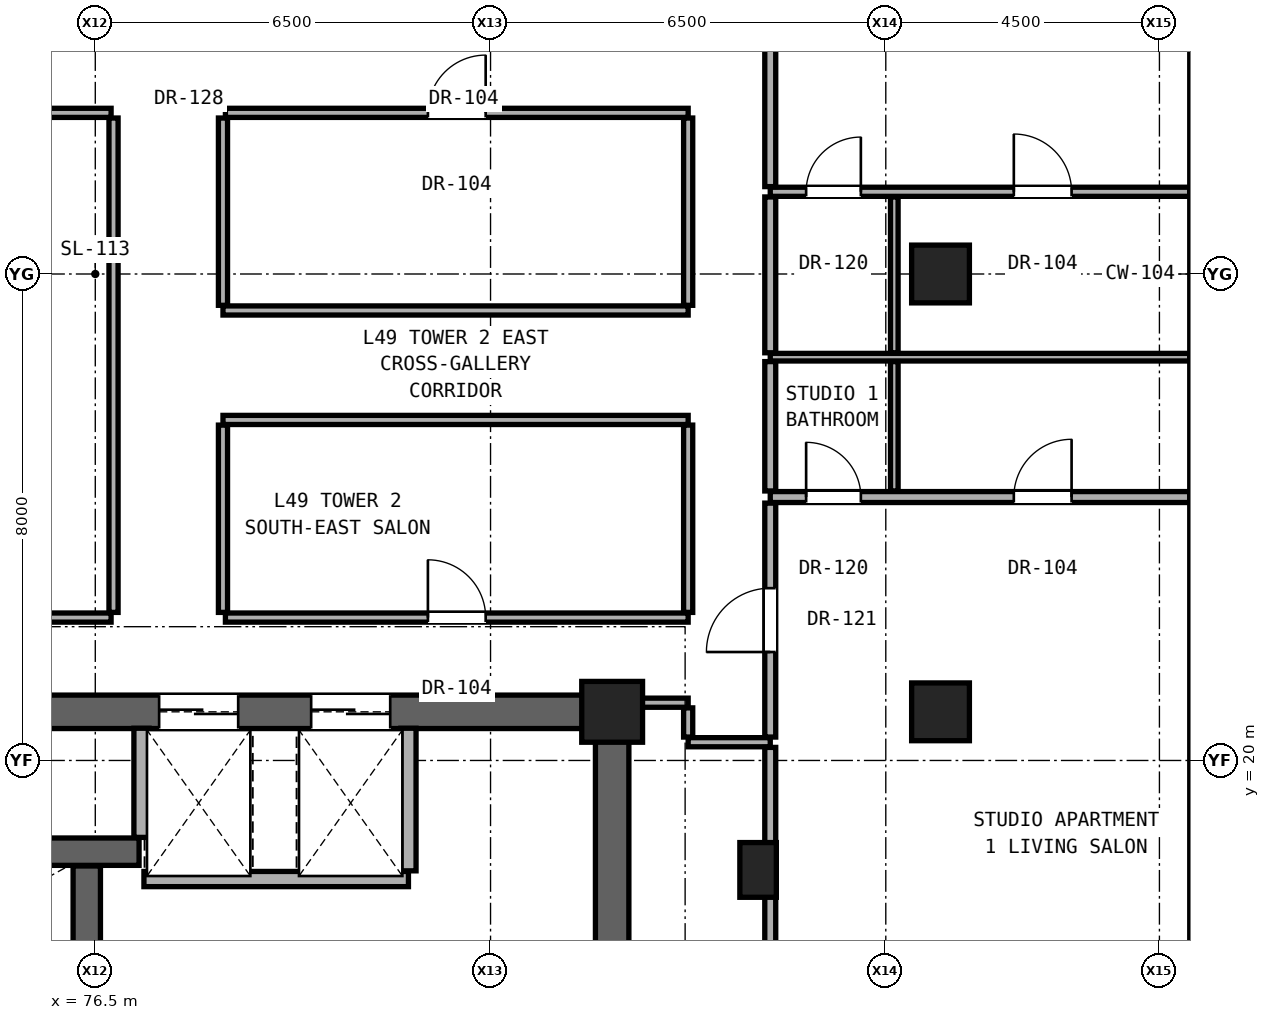
"""IFC4 building model, lengths in metres.
Left out: names, types, materials, properties, quantities, classifications, styles, units other than length and angle.
Written with IfcOpenShell. Run it as: python <this file> out.ifc"""

import sys

from ifc_helpers import new_model, si_unit, direction, frame, frame_2d, origin, origin_2d, place, context, subcontext, project, spatial, rectangle, hollow_rectangle, extrude, element, fill, save


model = new_model("IFC4")
c1 = context("Model", 3, precision=1e-05, world=origin(), true_north=direction((0.0, 1.0)))
c2 = subcontext(c1, "Body", "Model", "MODEL_VIEW")
j1 = project(units=[si_unit("LENGTHUNIT", "METRE"), si_unit("PLANEANGLEUNIT", "RADIAN")], contexts=[c1])
p1 = place(None, origin())
s1 = spatial("IfcSite", under=j1, at=p1, CompositionType="ELEMENT")
p2 = place(p1, origin())
s2 = spatial("IfcBuilding", under=s1, at=p2, CompositionType="ELEMENT")
p3 = place(p2, frame((0.0, 0.0, 173.9)))
s3 = spatial("IfcBuildingStorey", under=s2, at=p3, CompositionType="ELEMENT", Elevation=173.9)
p4 = place(p3, frame((85.0, 20.8, 0.0), z_axis=(0.0, 0.0, 1.0), x_axis=(1.0, 0.0, 0.0)))
e1 = element("IfcColumn", 1, at=p4, inside=s3, PredefinedType="COLUMN", context=c2, shape_type="SweptSolid", body=[
    extrude(rectangle(XDim=1.0, YDim=1.0, at=origin_2d()), origin(), (0.0, 0.0, 1.0), 3.25),
])
for number, where, z_axis, x_axis in (
    (2, (90.4, 20.8, 0.0), (0.0, 0.0, 1.0), (1.0, 0.0, 0.0)),
    (3, (90.4, 28.0, 0.0), (0.0, 0.0, 1.0), (1.0, 0.0, 0.0)),
):
    element("IfcColumn", number, at=place(p3, frame(where, z_axis=z_axis, x_axis=x_axis)), inside=s3, PredefinedType="COLUMN", context=c2, shape_type="SweptSolid", body=[
        extrude(hollow_rectangle(XDim=0.95, YDim=0.95, WallThickness=0.05, at=origin_2d()), origin(), (0.0, 0.0, 1.0), 3.25),
    ])
p5 = place(p3, frame((87.4, 18.2, 0.0), z_axis=(0.0, 0.0, 1.0), x_axis=(1.0, 0.0, 0.0)))
e4 = element("IfcColumn", 4, at=p5, inside=s3, PredefinedType="PILASTER", context=c2, shape_type="SweptSolid", body=[
    extrude(rectangle(XDim=0.6, YDim=0.9, at=origin_2d()), origin(), (0.0, 0.0, 1.0), 3.25),
])
p6 = place(p3, frame((85.0, 15.2, 0.0), z_axis=(0.0, 0.0, 1.0), x_axis=(0.0, 1.0, 0.0)))
e5 = element("IfcWall", 5, at=p6, inside=s3, PredefinedType="SHEAR", context=c2, shape_type="SweptSolid", body=[
    extrude(rectangle(XDim=5.6, YDim=0.55, at=frame_2d((2.8, 0.0))), origin(), (0.0, 0.0, 1.0), 3.05),
])
p7 = place(p3, frame((68.0, 20.8, 0.0), z_axis=(0.0, 0.0, 1.0), x_axis=(1.0, 0.0, 0.0)))
e6 = element("IfcWall", 6, at=p7, inside=s3, PredefinedType="SHEAR", context=c2, shape_type="SweptSolid", body=[
    extrude(rectangle(XDim=17.0, YDim=0.55, at=frame_2d((8.5, 0.0))), origin(), (0.0, 0.0, 1.0), 3.05),
])
p8 = place(p7, frame((9.55, 0.0, 0.0)))
e7 = element("IfcOpeningElement", 7, at=p8, cuts=e6, PredefinedType="OPENING", context=c2, shape_type="SweptSolid", body=[
    extrude(rectangle(XDim=1.3, YDim=2.3, at=frame_2d((0.65, 1.15))), frame((0.0, 0.285, 0.0), z_axis=(0.0, -1.0, 0.0), x_axis=(1.0, 0.0, 0.0)), (0.0, 0.0, 1.0), 0.57),
])
p9 = place(p7, frame((12.05, 0.0, 0.0)))
e8 = element("IfcOpeningElement", 8, at=p9, cuts=e6, PredefinedType="OPENING", context=c2, shape_type="SweptSolid", body=[
    extrude(rectangle(XDim=1.3, YDim=2.3, at=frame_2d((0.65, 1.15))), frame((0.0, 0.285, 0.0), z_axis=(0.0, -1.0, 0.0), x_axis=(1.0, 0.0, 0.0)), (0.0, 0.0, 1.0), 0.57),
])
p10 = place(p3, frame((77.3, 18.05, 0.0), z_axis=(0.0, 0.0, 1.0), x_axis=(1.0, 0.0, 0.0)))
e9 = element("IfcWall", 9, at=p10, inside=s3, PredefinedType="SOLIDWALL", context=c2, shape_type="SweptSolid", body=[
    extrude(rectangle(XDim=4.35, YDim=0.25, at=frame_2d((2.175, 0.0))), origin(), (0.0, 0.0, 1.0), 3.05),
])
p11 = place(p3, frame((68.27, 18.5, 0.0), z_axis=(0.0, 0.0, 1.0), x_axis=(1.0, 0.0, 0.0)))
e10 = element("IfcWall", 10, at=p11, inside=s3, PredefinedType="SHEAR", context=c2, shape_type="SweptSolid", body=[
    extrude(rectangle(XDim=8.95, YDim=0.45, at=frame_2d((4.475, 0.0))), origin(), (0.0, 0.0, 1.0), 3.05),
])
p12 = place(p11, frame((0.52, 0.0, 0.0)))
e11 = element("IfcOpeningElement", 11, at=p12, cuts=e10, PredefinedType="OPENING", context=c2, shape_type="SweptSolid", body=[
    extrude(rectangle(XDim=1.15, YDim=2.2, at=frame_2d((0.575, 1.1))), frame((0.0, 0.235, 0.0), z_axis=(0.0, -1.0, 0.0), x_axis=(1.0, 0.0, 0.0)), (0.0, 0.0, 1.0), 0.47),
])
p13 = place(p3, frame((86.25, 20.3, 0.0), z_axis=(0.0, 0.0, 1.0), x_axis=(1.0, 0.0, 0.0)))
e12 = element("IfcWall", 12, at=p13, inside=s3, PredefinedType="PARTITIONING", context=c2, shape_type="SweptSolid", body=[
    extrude(rectangle(XDim=1.35, YDim=0.15, at=frame_2d((0.675, 0.0))), origin(), (0.0, 0.0, 1.0), 3.05),
])
p14 = place(p3, frame((85.27, 20.95, 0.0), z_axis=(0.0, 0.0, 1.0), x_axis=(1.0, 0.0, 0.0)))
e13 = element("IfcWall", 13, at=p14, inside=s3, PredefinedType="PARTITIONING", context=c2, shape_type="SweptSolid", body=[
    extrude(rectangle(XDim=0.98, YDim=0.15, at=frame_2d((0.49, 0.0))), origin(), (0.0, 0.0, 1.0), 2.442),
])
p15 = place(p3, frame((66.62, 22.35, 0.0), z_axis=(0.0, 0.0, 1.0), x_axis=(1.0, 0.0, 0.0)))
e14 = element("IfcWall", 14, at=p15, inside=s3, PredefinedType="PARTITIONING", context=c2, shape_type="SweptSolid", body=[
    extrude(rectangle(XDim=10.14, YDim=0.15, at=frame_2d((5.07, 0.0))), origin(), (0.0, 0.0, 1.0), 2.186),
])
p16 = place(p3, frame((78.64, 22.35, 0.0), z_axis=(0.0, 0.0, 1.0), x_axis=(1.0, 0.0, 0.0)))
e15 = element("IfcWall", 15, at=p16, inside=s3, PredefinedType="PARTITIONING", context=c2, shape_type="SweptSolid", body=[
    extrude(rectangle(XDim=7.61, YDim=0.15, at=frame_2d((3.805, 0.0))), origin(), (0.0, 0.0, 1.0), 2.186),
])
p17 = place(p16, frame((3.33, 0.0, 0.0)))
e16 = element("IfcOpeningElement", 16, at=p17, cuts=e15, PredefinedType="OPENING", context=c2, shape_type="SweptSolid", body=[
    extrude(rectangle(XDim=0.95, YDim=2.15, at=frame_2d((0.475, 1.075))), frame((0.0, 0.085, 0.0), z_axis=(0.0, -1.0, 0.0), x_axis=(1.0, 0.0, 0.0)), (0.0, 0.0, 1.0), 0.17),
])
p18 = place(p3, frame((87.6, 24.332, 0.0), z_axis=(0.0, 0.0, 1.0), x_axis=(1.0, 0.0, 0.0)))
e17 = element("IfcWall", 17, at=p18, inside=s3, PredefinedType="PARTITIONING", context=c2, shape_type="SweptSolid", body=[
    extrude(rectangle(XDim=6.961, YDim=0.18, at=frame_2d((3.48, 0.0))), origin(), (0.0, 0.0, 1.0), 2.269),
])
p19 = place(p18, frame((4.006, 0.0, 0.0)))
e18 = element("IfcOpeningElement", 18, at=p19, cuts=e17, PredefinedType="OPENING", context=c2, shape_type="SweptSolid", body=[
    extrude(rectangle(XDim=0.95, YDim=2.15, at=frame_2d((0.475, 1.075))), frame((0.0, 0.1, 0.0), z_axis=(0.0, -1.0, 0.0), x_axis=(1.0, 0.0, 0.0)), (0.0, 0.0, 1.0), 0.2),
])
p20 = place(p18, frame((0.59, 0.0, 0.0)))
e19 = element("IfcOpeningElement", 19, at=p20, cuts=e17, PredefinedType="OPENING", context=c2, shape_type="SweptSolid", body=[
    extrude(rectangle(XDim=0.9, YDim=2.1, at=frame_2d((0.45, 1.05))), frame((0.0, 0.1, 0.0), z_axis=(0.0, -1.0, 0.0), x_axis=(1.0, 0.0, 0.0)), (0.0, 0.0, 1.0), 0.2),
])
p21 = place(p3, frame((78.6, 25.6, 0.0), z_axis=(0.0, 0.0, 1.0), x_axis=(1.0, 0.0, 0.0)))
e20 = element("IfcWall", 20, at=p21, inside=s3, PredefinedType="PARTITIONING", context=c2, shape_type="SweptSolid", body=[
    extrude(rectangle(XDim=7.65, YDim=0.15, at=frame_2d((3.825, 0.0))), origin(), (0.0, 0.0, 1.0), 2.186),
])
p22 = place(p3, frame((87.6, 26.632, 0.0), z_axis=(0.0, 0.0, 1.0), x_axis=(1.0, 0.0, 0.0)))
e21 = element("IfcWall", 21, at=p22, inside=s3, PredefinedType="PARTITIONING", context=c2, shape_type="SweptSolid", body=[
    extrude(rectangle(XDim=6.961, YDim=0.125, at=frame_2d((3.48, 0.0))), origin(), (0.0, 0.0, 1.0), 2.269),
])
p23 = place(p3, frame((78.6, 27.4, 0.0), z_axis=(0.0, 0.0, 1.0), x_axis=(1.0, 0.0, 0.0)))
e22 = element("IfcWall", 22, at=p23, inside=s3, PredefinedType="PARTITIONING", context=c2, shape_type="SweptSolid", body=[
    extrude(rectangle(XDim=7.65, YDim=0.15, at=frame_2d((3.825, 0.0))), origin(), (0.0, 0.0, 1.0), 2.186),
])
p24 = place(p3, frame((87.6, 29.352, 0.0), z_axis=(0.0, 0.0, 1.0), x_axis=(1.0, 0.0, 0.0)))
e23 = element("IfcWall", 23, at=p24, inside=s3, PredefinedType="PARTITIONING", context=c2, shape_type="SweptSolid", body=[
    extrude(rectangle(XDim=6.961, YDim=0.15, at=frame_2d((3.48, 0.0))), origin(), (0.0, 0.0, 1.0), 2.269),
])
p25 = place(p24, frame((4.006, 0.0, 0.0)))
e24 = element("IfcOpeningElement", 24, at=p25, cuts=e23, PredefinedType="OPENING", context=c2, shape_type="SweptSolid", body=[
    extrude(rectangle(XDim=0.95, YDim=2.15, at=frame_2d((0.475, 1.075))), frame((0.0, 0.085, 0.0), z_axis=(0.0, -1.0, 0.0), x_axis=(1.0, 0.0, 0.0)), (0.0, 0.0, 1.0), 0.17),
])
p26 = place(p24, frame((0.59, 0.0, 0.0)))
e25 = element("IfcOpeningElement", 25, at=p26, cuts=e23, PredefinedType="OPENING", context=c2, shape_type="SweptSolid", body=[
    extrude(rectangle(XDim=0.9, YDim=2.1, at=frame_2d((0.45, 1.05))), frame((0.0, 0.085, 0.0), z_axis=(0.0, -1.0, 0.0), x_axis=(1.0, 0.0, 0.0)), (0.0, 0.0, 1.0), 0.17),
])
p27 = place(p3, frame((66.62, 30.65, 0.0), z_axis=(0.0, 0.0, 1.0), x_axis=(1.0, 0.0, 0.0)))
e26 = element("IfcWall", 26, at=p27, inside=s3, PredefinedType="PARTITIONING", context=c2, shape_type="SweptSolid", body=[
    extrude(rectangle(XDim=10.14, YDim=0.15, at=frame_2d((5.07, 0.0))), origin(), (0.0, 0.0, 1.0), 2.186),
])
p28 = place(p27, frame((6.14, 0.0, 0.0)))
e27 = element("IfcOpeningElement", 27, at=p28, cuts=e26, PredefinedType="OPENING", context=c2, shape_type="SweptSolid", body=[
    extrude(rectangle(XDim=0.95, YDim=2.15, at=frame_2d((0.475, 1.075))), frame((0.0, 0.085, 0.0), z_axis=(0.0, -1.0, 0.0), x_axis=(1.0, 0.0, 0.0)), (0.0, 0.0, 1.0), 0.17),
])
p29 = place(p3, frame((78.64, 30.65, 0.0), z_axis=(0.0, 0.0, 1.0), x_axis=(1.0, 0.0, 0.0)))
e28 = element("IfcWall", 28, at=p29, inside=s3, PredefinedType="PARTITIONING", context=c2, shape_type="SweptSolid", body=[
    extrude(rectangle(XDim=7.61, YDim=0.15, at=frame_2d((3.805, 0.0))), origin(), (0.0, 0.0, 1.0), 2.186),
])
p30 = place(p29, frame((3.33, 0.0, 0.0)))
e29 = element("IfcOpeningElement", 29, at=p30, cuts=e28, PredefinedType="OPENING", context=c2, shape_type="SweptSolid", body=[
    extrude(rectangle(XDim=0.95, YDim=2.15, at=frame_2d((0.475, 1.075))), frame((0.0, 0.085, 0.0), z_axis=(0.0, -1.0, 0.0), x_axis=(1.0, 0.0, 0.0)), (0.0, 0.0, 1.0), 0.17),
])
p31 = place(p3, frame((76.36, 15.715, 0.0), z_axis=(0.0, 0.0, 1.0), x_axis=(0.0, 1.0, 0.0)))
e30 = element("IfcWall", 30, at=p31, inside=s3, PredefinedType="SHEAR", context=c2, shape_type="SweptSolid", body=[
    extrude(rectangle(XDim=2.55, YDim=0.45, at=frame_2d((1.275, 0.0))), origin(), (0.0, 0.0, 1.0), 3.05),
])
p32 = place(p3, frame((76.8, 22.435, 0.0), z_axis=(0.0, 0.0, 1.0), x_axis=(0.0, 1.0, 0.0)))
e31 = element("IfcWall", 31, at=p32, inside=s3, PredefinedType="PARTITIONING", context=c2, shape_type="SweptSolid", body=[
    extrude(rectangle(XDim=8.13, YDim=0.15, at=frame_2d((4.065, 0.0))), origin(), (0.0, 0.0, 1.0), 2.186),
])
p33 = place(p3, frame((77.26, 18.735, 0.0), z_axis=(0.0, 0.0, 1.0), x_axis=(0.0, 1.0, 0.0)))
e32 = element("IfcWall", 32, at=p33, inside=s3, PredefinedType="SOLIDWALL", context=c2, shape_type="SweptSolid", body=[
    extrude(rectangle(XDim=1.795, YDim=0.25, at=frame_2d((0.897, 0.0))), origin(), (0.0, 0.0, 1.0), 3.05),
])
p34 = place(p3, frame((78.6, 22.435, 0.0), z_axis=(0.0, 0.0, 1.0), x_axis=(0.0, 1.0, 0.0)))
e33 = element("IfcWall", 33, at=p34, inside=s3, PredefinedType="PARTITIONING", context=c2, shape_type="SweptSolid", body=[
    extrude(rectangle(XDim=3.08, YDim=0.15, at=frame_2d((1.54, 0.0))), origin(), (0.0, 0.0, 1.0), 3.05),
])
p35 = place(p3, frame((78.6, 27.485, 0.0), z_axis=(0.0, 0.0, 1.0), x_axis=(0.0, 1.0, 0.0)))
e34 = element("IfcWall", 34, at=p35, inside=s3, PredefinedType="PARTITIONING", context=c2, shape_type="SweptSolid", body=[
    extrude(rectangle(XDim=3.08, YDim=0.15, at=frame_2d((1.54, 0.0))), origin(), (0.0, 0.0, 1.0), 2.186),
])
p36 = place(p3, frame((81.65, 18.185, 0.0), z_axis=(0.0, 0.0, 1.0), x_axis=(0.0, 1.0, 0.0)))
e35 = element("IfcWall", 35, at=p36, inside=s3, PredefinedType="SOLIDWALL", context=c2, shape_type="SweptSolid", body=[
    extrude(rectangle(XDim=2.345, YDim=0.25, at=frame_2d((1.172, 0.0))), origin(), (0.0, 0.0, 1.0), 3.05),
])
p37 = place(p3, frame((86.25, 20.385, 0.0), z_axis=(0.0, 0.0, 1.0), x_axis=(0.0, 1.0, 0.0)))
e36 = element("IfcWall", 36, at=p37, inside=s3, PredefinedType="PARTITIONING", context=c2, shape_type="SweptSolid", body=[
    extrude(rectangle(XDim=0.48, YDim=0.15, at=frame_2d((0.24, 0.0))), origin(), (0.0, 0.0, 1.0), 2.442),
])
p38 = place(p3, frame((86.25, 22.435, 0.0), z_axis=(0.0, 0.0, 1.0), x_axis=(0.0, 1.0, 0.0)))
e37 = element("IfcWall", 37, at=p38, inside=s3, PredefinedType="PARTITIONING", context=c2, shape_type="SweptSolid", body=[
    extrude(rectangle(XDim=3.08, YDim=0.15, at=frame_2d((1.54, 0.0))), origin(), (0.0, 0.0, 1.0), 3.05),
])
p39 = place(p3, frame((86.25, 27.485, 0.0), z_axis=(0.0, 0.0, 1.0), x_axis=(0.0, 1.0, 0.0)))
e38 = element("IfcWall", 38, at=p39, inside=s3, PredefinedType="PARTITIONING", context=c2, shape_type="SweptSolid", body=[
    extrude(rectangle(XDim=3.08, YDim=0.15, at=frame_2d((1.54, 0.0))), origin(), (0.0, 0.0, 1.0), 2.346),
])
p40 = place(p3, frame((87.6, 16.774, 0.0), z_axis=(0.0, 0.0, 1.0), x_axis=(0.0, 1.0, 0.0)))
e39 = element("IfcWall", 39, at=p40, inside=s3, PredefinedType="PARTITIONING", context=c2, shape_type="SweptSolid", body=[
    extrude(rectangle(XDim=3.441, YDim=0.18, at=frame_2d((1.721, 0.0))), origin(), (0.0, 0.0, 1.0), 2.493),
])
p41 = place(p3, frame((87.6, 20.385, 0.0), z_axis=(0.0, 0.0, 1.0), x_axis=(0.0, 1.0, 0.0)))
e40 = element("IfcWall", 40, at=p41, inside=s3, PredefinedType="PARTITIONING", context=c2, shape_type="SweptSolid", body=[
    extrude(rectangle(XDim=3.847, YDim=0.18, at=frame_2d((1.923, 0.0))), origin(), (0.0, 0.0, 1.0), 2.442),
])
p42 = place(p41, frame((1.398, 0.0, 0.0)))
e41 = element("IfcOpeningElement", 41, at=p42, cuts=e40, PredefinedType="OPENING", context=c2, shape_type="SweptSolid", body=[
    extrude(rectangle(XDim=1.05, YDim=2.2, at=frame_2d((0.525, 1.1))), frame((0.0, 0.1, 0.0), z_axis=(0.0, -1.0, 0.0), x_axis=(1.0, 0.0, 0.0)), (0.0, 0.0, 1.0), 0.2),
])
p43 = place(p3, frame((87.6, 24.432, 0.0), z_axis=(0.0, 0.0, 1.0), x_axis=(0.0, 1.0, 0.0)))
e42 = element("IfcWall", 42, at=p43, inside=s3, PredefinedType="PARTITIONING", context=c2, shape_type="SweptSolid", body=[
    extrude(rectangle(XDim=2.128, YDim=0.18, at=frame_2d((1.064, 0.0))), origin(), (0.0, 0.0, 1.0), 3.05),
])
p44 = place(p3, frame((87.6, 26.705, 0.0), z_axis=(0.0, 0.0, 1.0), x_axis=(0.0, 1.0, 0.0)))
e43 = element("IfcWall", 43, at=p44, inside=s3, PredefinedType="PARTITIONING", context=c2, shape_type="SweptSolid", body=[
    extrude(rectangle(XDim=2.562, YDim=0.18, at=frame_2d((1.281, 0.0))), origin(), (0.0, 0.0, 1.0), 2.346),
])
p45 = place(p3, frame((87.6, 29.437, 0.0), z_axis=(0.0, 0.0, 1.0), x_axis=(0.0, 1.0, 0.0)))
e44 = element("IfcWall", 44, at=p45, inside=s3, PredefinedType="PARTITIONING", context=c2, shape_type="SweptSolid", body=[
    extrude(rectangle(XDim=6.178, YDim=0.18, at=frame_2d((3.089, 0.0))), origin(), (0.0, 0.0, 1.0), 2.442),
])
p46 = place(p45, frame((2.564, 0.0, 0.0)))
e45 = element("IfcOpeningElement", 45, at=p46, cuts=e44, PredefinedType="OPENING", context=c2, shape_type="SweptSolid", body=[
    extrude(rectangle(XDim=1.05, YDim=2.2, at=frame_2d((0.525, 1.1))), frame((0.0, 0.1, 0.0), z_axis=(0.0, -1.0, 0.0), x_axis=(1.0, 0.0, 0.0)), (0.0, 0.0, 1.0), 0.2),
])
p47 = place(p3, frame((89.64, 24.432, 0.0), z_axis=(0.0, 0.0, 1.0), x_axis=(0.0, 1.0, 0.0)))
e46 = element("IfcWall", 46, at=p47, inside=s3, PredefinedType="PARTITIONING", context=c2, shape_type="SweptSolid", body=[
    extrude(rectangle(XDim=2.128, YDim=0.125, at=frame_2d((1.064, 0.0))), origin(), (0.0, 0.0, 1.0), 3.05),
])
p48 = place(p3, frame((89.64, 26.705, 0.0), z_axis=(0.0, 0.0, 1.0), x_axis=(0.0, 1.0, 0.0)))
e47 = element("IfcWall", 47, at=p48, inside=s3, PredefinedType="PARTITIONING", context=c2, shape_type="SweptSolid", body=[
    extrude(rectangle(XDim=2.562, YDim=0.125, at=frame_2d((1.281, 0.0))), origin(), (0.0, 0.0, 1.0), 2.346),
])
p49 = place(p42, origin())
e48 = element("IfcDoor", 48, at=p49, inside=s3, OperationType="SINGLE_SWING_LEFT", PredefinedType="DOOR", context=c2, shape_type="SweptSolid", body=[
    extrude(rectangle(XDim=1.05, YDim=2.2, at=frame_2d((0.525, 1.1))), frame((0.0, 0.025, 0.0), z_axis=(0.0, -1.0, 0.0), x_axis=(1.0, 0.0, 0.0)), (0.0, 0.0, 1.0), 0.05),
])
fill(e41, e48)
p50 = place(p19, origin())
e49 = element("IfcDoor", 49, at=p50, inside=s3, OperationType="SINGLE_SWING_RIGHT", PredefinedType="DOOR", context=c2, shape_type="SweptSolid", body=[
    extrude(rectangle(XDim=0.95, YDim=2.15, at=frame_2d((0.475, 1.075))), frame((0.0, 0.025, 0.0), z_axis=(0.0, -1.0, 0.0), x_axis=(1.0, 0.0, 0.0)), (0.0, 0.0, 1.0), 0.05),
])
fill(e18, e49)
p51 = place(p20, origin())
e50 = element("IfcDoor", 50, at=p51, inside=s3, OperationType="SINGLE_SWING_LEFT", PredefinedType="DOOR", context=c2, shape_type="SweptSolid", body=[
    extrude(rectangle(XDim=0.9, YDim=2.1, at=frame_2d((0.45, 1.05))), frame((0.0, 0.025, 0.0), z_axis=(0.0, -1.0, 0.0), x_axis=(1.0, 0.0, 0.0)), (0.0, 0.0, 1.0), 0.05),
])
fill(e19, e50)
p52 = place(p25, origin())
e51 = element("IfcDoor", 51, at=p52, inside=s3, OperationType="SINGLE_SWING_LEFT", PredefinedType="DOOR", context=c2, shape_type="SweptSolid", body=[
    extrude(rectangle(XDim=0.95, YDim=2.15, at=frame_2d((0.475, 1.075))), frame((0.0, 0.025, 0.0), z_axis=(0.0, -1.0, 0.0), x_axis=(1.0, 0.0, 0.0)), (0.0, 0.0, 1.0), 0.05),
])
fill(e24, e51)
p53 = place(p26, origin())
e52 = element("IfcDoor", 52, at=p53, inside=s3, OperationType="SINGLE_SWING_RIGHT", PredefinedType="DOOR", context=c2, shape_type="SweptSolid", body=[
    extrude(rectangle(XDim=0.9, YDim=2.1, at=frame_2d((0.45, 1.05))), frame((0.0, 0.025, 0.0), z_axis=(0.0, -1.0, 0.0), x_axis=(1.0, 0.0, 0.0)), (0.0, 0.0, 1.0), 0.05),
])
fill(e25, e52)
p54 = place(p17, origin())
e53 = element("IfcDoor", 53, at=p54, inside=s3, OperationType="SINGLE_SWING_LEFT", PredefinedType="DOOR", context=c2, shape_type="SweptSolid", body=[
    extrude(rectangle(XDim=0.95, YDim=2.15, at=frame_2d((0.475, 1.075))), frame((0.0, 0.025, 0.0), z_axis=(0.0, -1.0, 0.0), x_axis=(1.0, 0.0, 0.0)), (0.0, 0.0, 1.0), 0.05),
])
fill(e16, e53)
p55 = place(p30, origin())
e54 = element("IfcDoor", 54, at=p55, inside=s3, OperationType="SINGLE_SWING_RIGHT", PredefinedType="DOOR", context=c2, shape_type="SweptSolid", body=[
    extrude(rectangle(XDim=0.95, YDim=2.15, at=frame_2d((0.475, 1.075))), frame((0.0, 0.025, 0.0), z_axis=(0.0, -1.0, 0.0), x_axis=(1.0, 0.0, 0.0)), (0.0, 0.0, 1.0), 0.05),
])
fill(e29, e54)
p56 = place(p8, origin())
e55 = element("IfcDoor", 55, at=p56, inside=s3, OperationType="DOUBLE_DOOR_SLIDING", PredefinedType="DOOR", context=c2, shape_type="SweptSolid", body=[
    extrude(rectangle(XDim=1.3, YDim=2.3, at=frame_2d((0.65, 1.15))), frame((0.0, 0.025, 0.0), z_axis=(0.0, -1.0, 0.0), x_axis=(1.0, 0.0, 0.0)), (0.0, 0.0, 1.0), 0.05),
])
fill(e7, e55)
p57 = place(p9, origin())
e56 = element("IfcDoor", 56, at=p57, inside=s3, OperationType="DOUBLE_DOOR_SLIDING", PredefinedType="DOOR", context=c2, shape_type="SweptSolid", body=[
    extrude(rectangle(XDim=1.3, YDim=2.3, at=frame_2d((0.65, 1.15))), frame((0.0, 0.025, 0.0), z_axis=(0.0, -1.0, 0.0), x_axis=(1.0, 0.0, 0.0)), (0.0, 0.0, 1.0), 0.05),
])
fill(e8, e56)
save(model, sys.argv[1])
